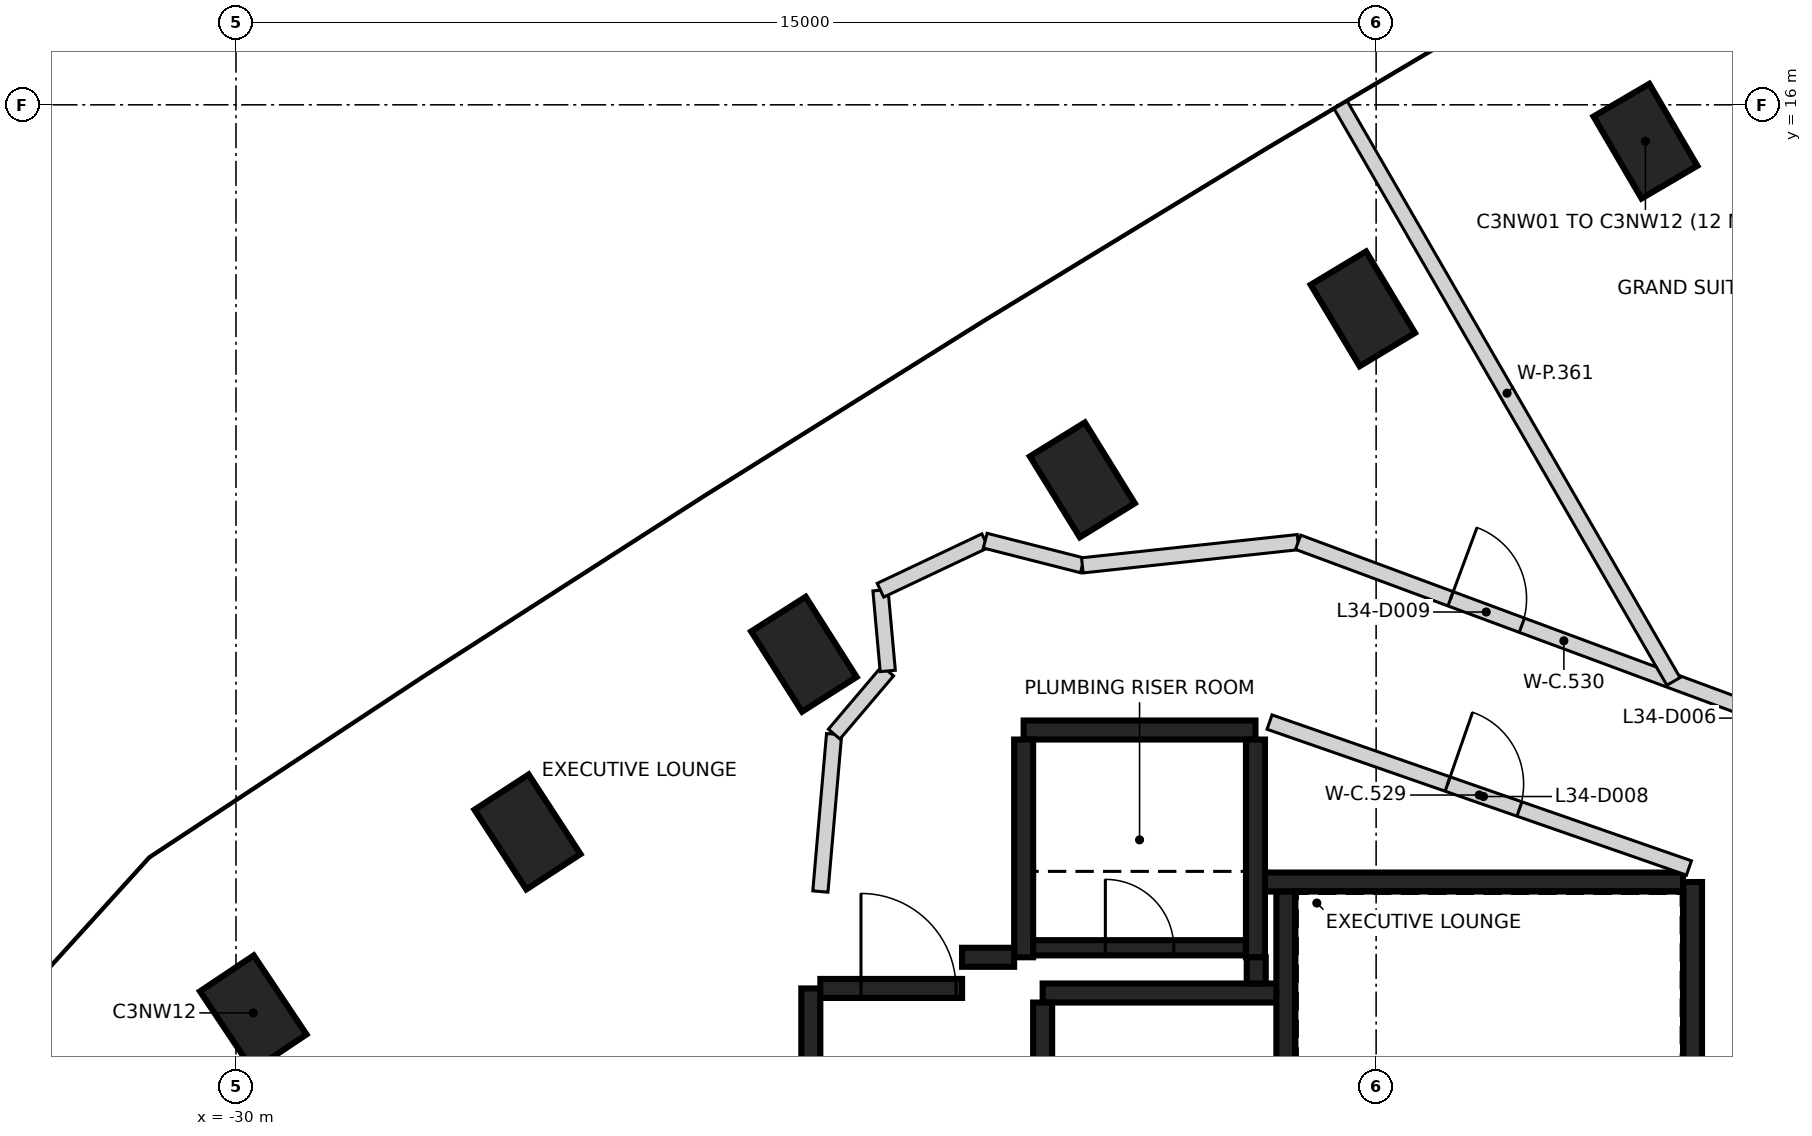
"""IFC4 building model, lengths in metres.
Left out: names, types, materials, properties, quantities, classifications, styles, units other than length and angle.
Written with IfcOpenShell. Run it as: python <this file> out.ifc"""

import sys

from ifc_helpers import new_model, si_unit, direction, frame, frame_2d, origin, origin_2d, place, context, subcontext, project, spatial, rectangle, extrude, element, fill, save


model = new_model("IFC4")
c1 = context("Model", 3, precision=1e-05, world=origin(), true_north=direction((0.0, 1.0)))
c2 = subcontext(c1, "Body", "Model", "MODEL_VIEW")
j1 = project(units=[si_unit("LENGTHUNIT", "METRE"), si_unit("PLANEANGLEUNIT", "RADIAN")], contexts=[c1])
p1 = place(None, origin())
s1 = spatial("IfcSite", under=j1, at=p1, CompositionType="ELEMENT")
p2 = place(p1, origin())
s2 = spatial("IfcBuilding", under=s1, at=p2, CompositionType="ELEMENT")
p3 = place(p2, frame((0.0, 0.0, 139.6)))
s3 = spatial("IfcBuildingStorey", under=s2, at=p3, CompositionType="ELEMENT", Elevation=139.6)
for number, where, z_axis, x_axis in (
    (1, (-11.457, 15.522, -0.4), (0.0, 0.0, 1.0), (-0.505, 0.863, 0.0)),
    (2, (-15.175, 13.316, -0.4), (0.0, 0.0, 1.0), (-0.515, 0.857, 0.0)),
    (3, (-18.865, 11.066, -0.4), (0.0, 0.0, 1.0), (-0.526, 0.851, 0.0)),
    (4, (-22.529, 8.772, -0.4), (0.0, 0.0, 1.0), (-0.536, 0.844, 0.0)),
    (5, (-26.165, 6.434, -0.4), (0.0, 0.0, 1.0), (-0.546, 0.838, 0.0)),
    (6, (-29.773, 4.053, -0.4), (0.0, 0.0, 1.0), (-0.556, 0.831, 0.0)),
):
    element("IfcColumn", number, at=place(p3, frame(where, z_axis=z_axis, x_axis=x_axis)), inside=s3, PredefinedType="COLUMN", context=c2, shape_type="SweptSolid", body=[
        extrude(rectangle(XDim=1.25, YDim=0.85, at=origin_2d()), origin(), (0.0, 0.0, 1.0), 3.6),
    ])
p4 = place(p3, frame((-10.837, 5.775, 0.0), z_axis=(0.0, 0.0, 1.0), x_axis=(0.0, -1.0, 0.0)))
e7 = element("IfcWall", 7, at=p4, inside=s3, PredefinedType="SHEAR", context=c2, shape_type="SweptSolid", body=[
    extrude(rectangle(XDim=11.55, YDim=0.25, at=frame_2d((5.775, 0.0))), origin(), (0.0, 0.0, 1.0), 3.2),
])
p5 = place(p4, frame((10.025, 0.0, 0.0)))
e8 = element("IfcOpeningElement", 8, at=p5, cuts=e7, PredefinedType="OPENING", context=c2, shape_type="SweptSolid", body=[
    extrude(rectangle(XDim=1.2, YDim=2.1, at=frame_2d((0.6, 1.05))), frame((0.0, 0.135, 0.0), z_axis=(0.0, -1.0, 0.0), x_axis=(1.0, 0.0, 0.0)), (0.0, 0.0, 1.0), 0.27),
])
p6 = place(p4, frame((8.725, 0.0, 0.0)))
e9 = element("IfcOpeningElement", 9, at=p6, cuts=e7, PredefinedType="OPENING", context=c2, shape_type="SweptSolid", body=[
    extrude(rectangle(XDim=1.2, YDim=2.1, at=frame_2d((0.6, 1.05))), frame((0.0, 0.135, 0.0), z_axis=(0.0, -1.0, 0.0), x_axis=(1.0, 0.0, 0.0)), (0.0, 0.0, 1.0), 0.27),
])
p7 = place(p3, frame((-16.472, 5.775, 0.0), z_axis=(0.0, 0.0, 1.0), x_axis=(1.0, 0.0, 0.0)))
e10 = element("IfcWall", 10, at=p7, inside=s3, PredefinedType="SHEAR", context=c2, shape_type="SweptSolid", body=[
    extrude(rectangle(XDim=5.51, YDim=0.25, at=frame_2d((2.755, 0.0))), origin(), (0.0, 0.0, 1.0), 3.2),
])
p8 = place(p3, frame((-19.637, 7.775, 0.0), z_axis=(0.0, 0.0, 1.0), x_axis=(1.0, 0.0, 0.0)))
e11 = element("IfcWall", 11, at=p8, inside=s3, PredefinedType="SHEAR", context=c2, shape_type="SweptSolid", body=[
    extrude(rectangle(XDim=3.05, YDim=0.25, at=frame_2d((1.525, 0.0))), origin(), (0.0, 0.0, 1.0), 3.2),
])
for number, where, z_axis, x_axis in (
    (12, (-16.587, 7.65, 0.0), (0.0, 0.0, 1.0), (0.0, -1.0, 0.0)),
    (13, (-19.637, 4.785, 0.0), (0.0, 0.0, 1.0), (0.0, 1.0, 0.0)),
):
    element("IfcWall", number, at=place(p3, frame(where, z_axis=z_axis, x_axis=x_axis)), inside=s3, PredefinedType="SHEAR", context=c2, shape_type="SweptSolid", body=[
        extrude(rectangle(XDim=2.865, YDim=0.25, at=frame_2d((1.432, 0.0))), origin(), (0.0, 0.0, 1.0), 3.2),
    ])
p9 = place(p3, frame((-16.302, 4.315, 0.0), z_axis=(0.0, 0.0, 1.0), x_axis=(-1.0, 0.0, 0.0)))
e14 = element("IfcWall", 14, at=p9, inside=s3, PredefinedType="SHEAR", context=c2, shape_type="SweptSolid", body=[
    extrude(rectangle(XDim=3.085, YDim=0.25, at=frame_2d((1.542, 0.0))), origin(), (0.0, 0.0, 1.0), 3.2),
])
p10 = place(p3, frame((-16.187, 3.2, 0.0), z_axis=(0.0, 0.0, 1.0), x_axis=(0.0, 1.0, 0.0)))
e15 = element("IfcWall", 15, at=p10, inside=s3, PredefinedType="SHEAR", context=c2, shape_type="SweptSolid", body=[
    extrude(rectangle(XDim=2.449, YDim=0.25, at=frame_2d((1.225, 0.0))), origin(), (0.0, 0.0, 1.0), 3.2),
])
p11 = place(p3, frame((-22.437, 2.4, 0.0), z_axis=(0.0, 0.0, 1.0), x_axis=(0.0, 1.0, 0.0)))
e16 = element("IfcWall", 16, at=p11, inside=s3, PredefinedType="SHEAR", context=c2, shape_type="SweptSolid", body=[
    extrude(rectangle(XDim=1.975, YDim=0.25, at=frame_2d((0.987, 0.0))), origin(), (0.0, 0.0, 1.0), 3.2),
])
p12 = place(p3, frame((-22.312, 4.375, 0.0), z_axis=(0.0, 0.0, 1.0), x_axis=(1.0, 0.0, 0.0)))
e17 = element("IfcWall", 17, at=p12, inside=s3, PredefinedType="SHEAR", context=c2, shape_type="SweptSolid", body=[
    extrude(rectangle(XDim=1.865, YDim=0.25, at=frame_2d((0.932, 0.0))), origin(), (0.0, 0.0, 1.0), 3.2),
])
p13 = place(p12, frame((0.535, 0.0, 0.0)))
e18 = element("IfcOpeningElement", 18, at=p13, cuts=e17, PredefinedType="OPENING", context=c2, shape_type="SweptSolid", body=[
    extrude(rectangle(XDim=1.25, YDim=2.1, at=frame_2d((0.625, 1.05))), frame((0.0, 0.135, 0.0), z_axis=(0.0, -1.0, 0.0), x_axis=(1.0, 0.0, 0.0)), (0.0, 0.0, 1.0), 0.27),
])
p14 = place(p3, frame((-19.387, 4.19, 0.0), z_axis=(0.0, 0.0, 1.0), x_axis=(0.0, -1.0, 0.0)))
e19 = element("IfcWall", 19, at=p14, inside=s3, PredefinedType="SHEAR", context=c2, shape_type="SweptSolid", body=[
    extrude(rectangle(XDim=0.989, YDim=0.25, at=frame_2d((0.495, 0.0))), origin(), (0.0, 0.0, 1.0), 3.2),
])
p15 = place(p3, frame((-20.447, 4.785, 0.0), z_axis=(0.0, 0.0, 1.0), x_axis=(1.0, 0.0, 0.0)))
e20 = element("IfcWall", 20, at=p15, inside=s3, PredefinedType="SHEAR", context=c2, shape_type="SweptSolid", body=[
    extrude(rectangle(XDim=0.685, YDim=0.25, at=frame_2d((0.342, 0.0))), origin(), (0.0, 0.0, 1.0), 3.2),
])
p16 = place(p3, frame((-16.577, 4.785, 0.0), z_axis=(0.0, 0.0, 1.0), x_axis=(0.0, -1.0, 0.0)))
e21 = element("IfcWall", 21, at=p16, inside=s3, PredefinedType="SHEAR", context=c2, shape_type="SweptSolid", body=[
    extrude(rectangle(XDim=0.344, YDim=0.25, at=frame_2d((0.172, 0.0))), origin(), (0.0, 0.0, 1.0), 3.2),
])
p17 = place(p3, frame((-19.511, 4.91, 0.0), z_axis=(0.0, 0.0, 1.0), x_axis=(1.0, 0.0, 0.0)))
e22 = element("IfcWall", 22, at=p17, inside=s3, PredefinedType="SHEAR", context=c2, shape_type="SweptSolid", body=[
    extrude(rectangle(XDim=2.798, YDim=0.2, at=frame_2d((1.399, 0.0))), origin(), (0.0, 0.0, 1.0), 3.2),
])
p18 = place(p17, frame((0.949, 0.0, 0.0)))
e23 = element("IfcOpeningElement", 23, at=p18, cuts=e22, PredefinedType="OPENING", context=c2, shape_type="SweptSolid", body=[
    extrude(rectangle(XDim=0.9, YDim=2.1, at=frame_2d((0.45, 1.05))), frame((0.0, 0.11, 0.0), z_axis=(0.0, -1.0, 0.0), x_axis=(1.0, 0.0, 0.0)), (0.0, 0.0, 1.0), 0.22),
])
p19 = place(p3, frame((-22.131, 7.72, 0.0), z_axis=(0.0, 0.0, 1.0), x_axis=(-0.086827346826, -0.996223374471, 0.0)))
e24 = element("IfcWall", 24, at=p19, inside=s3, PredefinedType="PARTITIONING", context=c2, shape_type="SweptSolid", body=[
    extrude(rectangle(XDim=2.078, YDim=0.2, at=frame_2d((1.039, 0.0))), origin(), (0.0, 0.0, 1.0), 3.2),
])
p20 = place(p3, frame((-22.13, 7.721, 0.0), z_axis=(0.0, 0.0, 1.0), x_axis=(0.646815590698, 0.762646439466, 0.0)))
e25 = element("IfcWall", 25, at=p20, inside=s3, PredefinedType="PARTITIONING", context=c2, shape_type="SweptSolid", body=[
    extrude(rectangle(XDim=1.09, YDim=0.2, at=frame_2d((0.545, 0.0))), origin(), (0.0, 0.0, 1.0), 3.2),
])
p21 = place(p3, frame((-21.521, 9.614, 0.0), z_axis=(0.0, 0.0, 1.0), x_axis=(0.089978363699, -0.995943720331, 0.0)))
e26 = element("IfcWall", 26, at=p21, inside=s3, PredefinedType="PARTITIONING", context=c2, shape_type="SweptSolid", body=[
    extrude(rectangle(XDim=1.066, YDim=0.2, at=frame_2d((0.533, 0.0))), origin(), (0.0, 0.0, 1.0), 2.3),
])
p22 = place(p3, frame((-21.521, 9.614, 0.0), z_axis=(0.0, 0.0, 1.0), x_axis=(0.904083527367, 0.427355795028, 0.0)))
e27 = element("IfcWall", 27, at=p22, inside=s3, PredefinedType="PARTITIONING", context=c2, shape_type="SweptSolid", body=[
    extrude(rectangle(XDim=1.523, YDim=0.2, at=frame_2d((0.761, 0.0))), origin(), (0.0, 0.0, 1.0), 2.3),
])
p23 = place(p3, frame((-20.143, 10.266, 0.0), z_axis=(0.0, 0.0, 1.0), x_axis=(0.969121308325, -0.246584447505, 0.0)))
e28 = element("IfcWall", 28, at=p23, inside=s3, PredefinedType="PARTITIONING", context=c2, shape_type="SweptSolid", body=[
    extrude(rectangle(XDim=1.319, YDim=0.2, at=frame_2d((0.659, 0.0))), origin(), (0.0, 0.0, 1.0), 2.3),
])
p24 = place(p3, frame((-18.865, 9.941, 0.0), z_axis=(0.0, 0.0, 1.0), x_axis=(0.99423123086, 0.107257911519, 0.0)))
e29 = element("IfcWall", 29, at=p24, inside=s3, PredefinedType="PARTITIONING", context=c2, shape_type="SweptSolid", body=[
    extrude(rectangle(XDim=2.854, YDim=0.2, at=frame_2d((1.427, 0.0))), origin(), (0.0, 0.0, 1.0), 3.2),
])
p25 = place(p3, frame((-16.402, 7.879, 0.0), z_axis=(0.0, 0.0, 1.0), x_axis=(0.94449961557, -0.328512520596, 0.0)))
e30 = element("IfcWall", 30, at=p25, inside=s3, PredefinedType="PARTITIONING", context=c2, shape_type="SweptSolid", body=[
    extrude(rectangle(XDim=5.842, YDim=0.2, at=frame_2d((2.921, 0.0))), origin(), (0.0, 0.0, 1.0), 3.2),
])
p26 = place(p25, frame((2.481, 0.0, 0.0)))
e31 = element("IfcOpeningElement", 31, at=p26, cuts=e30, PredefinedType="OPENING", context=c2, shape_type="SweptSolid", body=[
    extrude(rectangle(XDim=1.0, YDim=2.1, at=frame_2d((0.5, 1.05))), frame((0.0, 0.11, 0.0), z_axis=(0.0, -1.0, 0.0), x_axis=(1.0, 0.0, 0.0)), (0.0, 0.0, 1.0), 0.22),
])
p27 = place(p3, frame((-16.026, 10.245, 0.0), z_axis=(0.0, 0.0, 1.0), x_axis=(0.937607706988, -0.347694963721, 0.0)))
e32 = element("IfcWall", 32, at=p27, inside=s3, PredefinedType="PARTITIONING", context=c2, shape_type="SweptSolid", body=[
    extrude(rectangle(XDim=7.458, YDim=0.2, at=frame_2d((3.729, 0.0))), origin(), (0.0, 0.0, 1.0), 3.2),
])
p28 = place(p27, frame((6.179, 0.0, 0.0)))
e33 = element("IfcOpeningElement", 33, at=p28, cuts=e32, PredefinedType="OPENING", context=c2, shape_type="SweptSolid", body=[
    extrude(rectangle(XDim=0.95, YDim=2.1, at=frame_2d((0.475, 1.05))), frame((0.0, 0.11, 0.0), z_axis=(0.0, -1.0, 0.0), x_axis=(1.0, 0.0, 0.0)), (0.0, 0.0, 1.0), 0.22),
])
p29 = place(p27, frame((2.139, 0.0, 0.0)))
e34 = element("IfcOpeningElement", 34, at=p29, cuts=e32, PredefinedType="OPENING", context=c2, shape_type="SweptSolid", body=[
    extrude(rectangle(XDim=1.0, YDim=2.1, at=frame_2d((0.5, 1.05))), frame((0.0, 0.11, 0.0), z_axis=(0.0, -1.0, 0.0), x_axis=(1.0, 0.0, 0.0)), (0.0, 0.0, 1.0), 0.22),
])
p30 = place(p3, frame((-15.467, 15.998, 0.0), z_axis=(0.0, 0.0, 1.0), x_axis=(0.500003998589, -0.866023095186, 0.0)))
e35 = element("IfcWall", 35, at=p30, inside=s3, PredefinedType="PARTITIONING", context=c2, shape_type="SweptSolid", body=[
    extrude(rectangle(XDim=8.757, YDim=0.2, at=frame_2d((4.379, 0.0))), origin(), (0.0, 0.0, 1.0), 2.3),
])
p31 = place(p3, frame((-10.809, 18.731, 0.0), z_axis=(0.0, 0.0, 1.0), x_axis=(0.500004774777, -0.866022647048, 0.0)))
e36 = element("IfcWall", 36, at=p31, inside=s3, PredefinedType="PARTITIONING", context=c2, shape_type="SweptSolid", body=[
    extrude(rectangle(XDim=12.227, YDim=0.2, at=frame_2d((6.113, 0.0))), origin(), (0.0, 0.0, 1.0), 2.3),
])
p32 = place(p13, origin())
e37 = element("IfcDoor", 37, at=p32, inside=s3, OperationType="SINGLE_SWING_LEFT", PredefinedType="DOOR", context=c2, shape_type="SweptSolid", body=[
    extrude(rectangle(XDim=1.25, YDim=2.1, at=frame_2d((0.625, 1.05))), frame((0.0, 0.025, 0.0), z_axis=(0.0, -1.0, 0.0), x_axis=(1.0, 0.0, 0.0)), (0.0, 0.0, 1.0), 0.05),
])
fill(e18, e37)
p33 = place(p18, origin())
e38 = element("IfcDoor", 38, at=p33, inside=s3, OperationType="SINGLE_SWING_LEFT", PredefinedType="DOOR", context=c2, shape_type="SweptSolid", body=[
    extrude(rectangle(XDim=0.9, YDim=2.1, at=frame_2d((0.45, 1.05))), frame((0.0, 0.025, 0.0), z_axis=(0.0, -1.0, 0.0), x_axis=(1.0, 0.0, 0.0)), (0.0, 0.0, 1.0), 0.05),
])
fill(e23, e38)
p34 = place(p26, frame((1.0, 0.0, 0.0), z_axis=(0.0, 0.0, 1.0), x_axis=(-1.0, 0.0, 0.0)))
e39 = element("IfcDoor", 39, at=p34, inside=s3, OperationType="SINGLE_SWING_LEFT", PredefinedType="DOOR", context=c2, shape_type="SweptSolid", body=[
    extrude(rectangle(XDim=1.0, YDim=2.1, at=frame_2d((0.5, 1.05))), frame((0.0, 0.025, 0.0), z_axis=(0.0, -1.0, 0.0), x_axis=(1.0, 0.0, 0.0)), (0.0, 0.0, 1.0), 0.05),
])
fill(e31, e39)
p35 = place(p29, frame((1.0, 0.0, 0.0), z_axis=(0.0, 0.0, 1.0), x_axis=(-1.0, 0.0, 0.0)))
e40 = element("IfcDoor", 40, at=p35, inside=s3, OperationType="SINGLE_SWING_LEFT", PredefinedType="DOOR", context=c2, shape_type="SweptSolid", body=[
    extrude(rectangle(XDim=1.0, YDim=2.1, at=frame_2d((0.5, 1.05))), frame((0.0, 0.025, 0.0), z_axis=(0.0, -1.0, 0.0), x_axis=(1.0, 0.0, 0.0)), (0.0, 0.0, 1.0), 0.05),
])
fill(e34, e40)
save(model, sys.argv[1])
